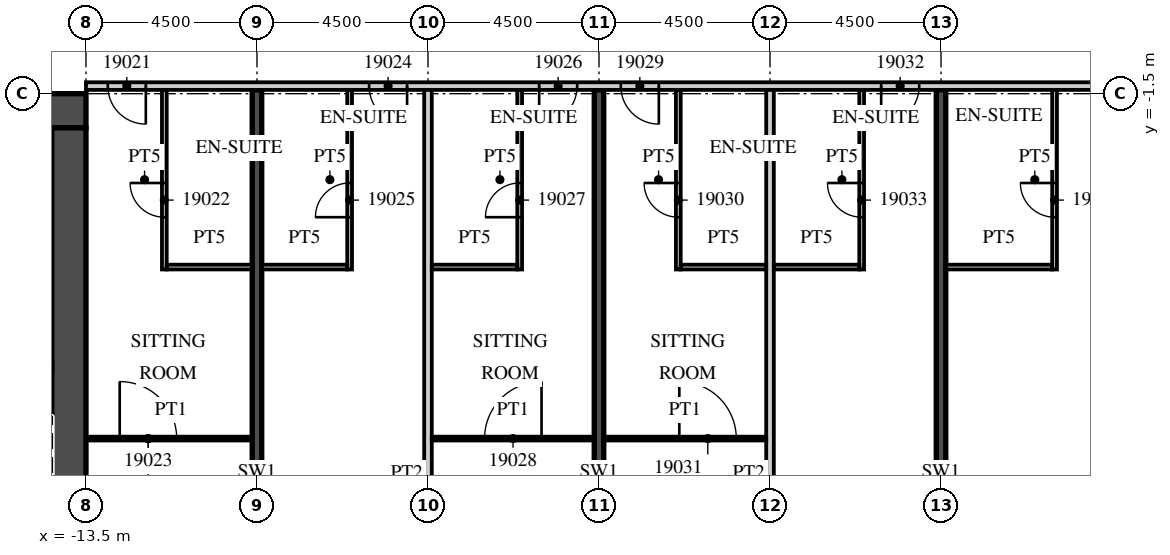
"""IFC4 building model, lengths in metres.
Left out: names, types, materials, properties, quantities, classifications, styles, units other than length and angle.
Written with IfcOpenShell. Run it as: python <this file> out.ifc"""

import sys

from ifc_helpers import new_model, si_unit, direction, frame, frame_2d, origin, place, context, subcontext, project, spatial, rectangle, extrude, element, fill, save


model = new_model("IFC4")
c1 = context("Model", 3, precision=1e-05, world=origin(), true_north=direction((0.0, 1.0)))
c2 = subcontext(c1, "Body", "Model", "MODEL_VIEW")
j1 = project(units=[si_unit("LENGTHUNIT", "METRE"), si_unit("PLANEANGLEUNIT", "RADIAN")], contexts=[c1])
p1 = place(None, origin())
s1 = spatial("IfcSite", under=j1, at=p1, CompositionType="ELEMENT")
p2 = place(p1, origin())
s2 = spatial("IfcBuilding", under=s1, at=p2, CompositionType="ELEMENT")
p3 = place(p2, frame((0.0, 0.0, 93.0)))
s3 = spatial("IfcBuildingStorey", under=s2, at=p3, CompositionType="ELEMENT", Elevation=93.0)
for number, where, z_axis, x_axis in (
    (1, (-9.0, -21.54, 0.0), (0.0, 0.0, 1.0), (0.0, 1.0, 0.0)),
    (2, (0.0, -21.54, 0.0), (0.0, 0.0, 1.0), (0.0, 1.0, 0.0)),
    (3, (9.0, -21.54, 0.0), (0.0, 0.0, 1.0), (0.0, 1.0, 0.0)),
):
    element("IfcWall", number, at=place(p3, frame(where, z_axis=z_axis, x_axis=x_axis)), inside=s3, PredefinedType="SHEAR", context=c2, shape_type="SweptSolid", body=[
        extrude(rectangle(XDim=20.14, YDim=0.25, at=frame_2d((10.07, 0.0))), origin(), (0.0, 0.0, 1.0), 3.3),
    ])
p4 = place(p3, frame((-13.5, -1.3, 0.0), z_axis=(0.0, 0.0, 1.0), x_axis=(1.0, 0.0, 0.0)))
e4 = element("IfcWall", 4, at=p4, inside=s3, PredefinedType="PARTITIONING", context=c2, shape_type="SweptSolid", body=[
    extrude(rectangle(XDim=58.05, YDim=0.2, at=frame_2d((29.025, 0.0))), origin(), (0.0, 0.0, 1.0), 3.02),
])
p5 = place(p4, frame((0.575, 0.0, 0.0)))
e5 = element("IfcOpeningElement", 5, at=p5, cuts=e4, PredefinedType="OPENING", context=c2, shape_type="SweptSolid", body=[
    extrude(rectangle(XDim=1.0, YDim=2.1, at=frame_2d((0.5, 1.05))), frame((0.0, 0.11, 0.0), z_axis=(0.0, -1.0, 0.0), x_axis=(1.0, 0.0, 0.0)), (0.0, 0.0, 1.0), 0.22),
])
p6 = place(p4, frame((7.45, 0.0, 0.0)))
e6 = element("IfcOpeningElement", 6, at=p6, cuts=e4, PredefinedType="OPENING", context=c2, shape_type="SweptSolid", body=[
    extrude(rectangle(XDim=1.0, YDim=2.1, at=frame_2d((0.5, 1.05))), frame((0.0, 0.11, 0.0), z_axis=(0.0, -1.0, 0.0), x_axis=(1.0, 0.0, 0.0)), (0.0, 0.0, 1.0), 0.22),
])
p7 = place(p4, frame((11.925, 0.0, 0.0)))
e7 = element("IfcOpeningElement", 7, at=p7, cuts=e4, PredefinedType="OPENING", context=c2, shape_type="SweptSolid", body=[
    extrude(rectangle(XDim=1.0, YDim=2.1, at=frame_2d((0.5, 1.05))), frame((0.0, 0.11, 0.0), z_axis=(0.0, -1.0, 0.0), x_axis=(1.0, 0.0, 0.0)), (0.0, 0.0, 1.0), 0.22),
])
p8 = place(p4, frame((14.075, 0.0, 0.0)))
e8 = element("IfcOpeningElement", 8, at=p8, cuts=e4, PredefinedType="OPENING", context=c2, shape_type="SweptSolid", body=[
    extrude(rectangle(XDim=1.0, YDim=2.1, at=frame_2d((0.5, 1.05))), frame((0.0, 0.11, 0.0), z_axis=(0.0, -1.0, 0.0), x_axis=(1.0, 0.0, 0.0)), (0.0, 0.0, 1.0), 0.22),
])
p9 = place(p4, frame((20.925, 0.0, 0.0)))
e9 = element("IfcOpeningElement", 9, at=p9, cuts=e4, PredefinedType="OPENING", context=c2, shape_type="SweptSolid", body=[
    extrude(rectangle(XDim=1.0, YDim=2.1, at=frame_2d((0.5, 1.05))), frame((0.0, 0.11, 0.0), z_axis=(0.0, -1.0, 0.0), x_axis=(1.0, 0.0, 0.0)), (0.0, 0.0, 1.0), 0.22),
])
p10 = place(p4, frame((27.862, 0.0, 0.0)))
e10 = element("IfcOpeningElement", 10, at=p10, cuts=e4, PredefinedType="OPENING", context=c2, shape_type="SweptSolid", body=[
    extrude(rectangle(XDim=1.2, YDim=2.1, at=frame_2d((0.6, 1.05))), frame((0.0, 0.11, 0.0), z_axis=(0.0, -1.0, 0.0), x_axis=(1.0, 0.0, 0.0)), (0.0, 0.0, 1.0), 0.22),
])
p11 = place(p4, frame((33.938, 0.0, 0.0)))
e11 = element("IfcOpeningElement", 11, at=p11, cuts=e4, PredefinedType="OPENING", context=c2, shape_type="SweptSolid", body=[
    extrude(rectangle(XDim=1.2, YDim=2.1, at=frame_2d((0.6, 1.05))), frame((0.0, 0.11, 0.0), z_axis=(0.0, -1.0, 0.0), x_axis=(1.0, 0.0, 0.0)), (0.0, 0.0, 1.0), 0.22),
])
p12 = place(p4, frame((45.862, 0.0, 0.0)))
e12 = element("IfcOpeningElement", 12, at=p12, cuts=e4, PredefinedType="OPENING", context=c2, shape_type="SweptSolid", body=[
    extrude(rectangle(XDim=1.2, YDim=2.1, at=frame_2d((0.6, 1.05))), frame((0.0, 0.11, 0.0), z_axis=(0.0, -1.0, 0.0), x_axis=(1.0, 0.0, 0.0)), (0.0, 0.0, 1.0), 0.22),
])
p13 = place(p4, frame((52.425, 0.0, 0.0)))
e13 = element("IfcOpeningElement", 13, at=p13, cuts=e4, PredefinedType="OPENING", context=c2, shape_type="SweptSolid", body=[
    extrude(rectangle(XDim=1.0, YDim=2.1, at=frame_2d((0.5, 1.05))), frame((0.0, 0.11, 0.0), z_axis=(0.0, -1.0, 0.0), x_axis=(1.0, 0.0, 0.0)), (0.0, 0.0, 1.0), 0.22),
])
p14 = place(p4, frame((56.525, 0.0, 0.0)))
e14 = element("IfcOpeningElement", 14, at=p14, cuts=e4, PredefinedType="OPENING", context=c2, shape_type="SweptSolid", body=[
    extrude(rectangle(XDim=1.0, YDim=2.1, at=frame_2d((0.5, 1.05))), frame((0.0, 0.11, 0.0), z_axis=(0.0, -1.0, 0.0), x_axis=(1.0, 0.0, 0.0)), (0.0, 0.0, 1.0), 0.22),
])
p15 = place(p3, frame((-11.438, -6.125, 0.0), z_axis=(0.0, 0.0, 1.0), x_axis=(0.0, 1.0, 0.0)))
e15 = element("IfcWall", 15, at=p15, inside=s3, PredefinedType="PARTITIONING", context=c2, shape_type="SweptSolid", body=[
    extrude(rectangle(XDim=4.725, YDim=0.125, at=frame_2d((2.363, 0.0))), origin(), (0.0, 0.0, 1.0), 3.02),
])
p16 = place(p15, frame((1.375, 0.0, 0.0)))
e16 = element("IfcOpeningElement", 16, at=p16, cuts=e15, PredefinedType="OPENING", context=c2, shape_type="SweptSolid", body=[
    extrude(rectangle(XDim=0.9, YDim=2.1, at=frame_2d((0.45, 1.05))), frame((0.0, 0.073, 0.0), z_axis=(0.0, -1.0, 0.0), x_axis=(1.0, 0.0, 0.0)), (0.0, 0.0, 1.0), 0.145),
])
p17 = place(p3, frame((-11.375, -6.062, 0.0), z_axis=(0.0, 0.0, 1.0), x_axis=(1.0, 0.0, 0.0)))
e17 = element("IfcWall", 17, at=p17, inside=s3, PredefinedType="PARTITIONING", context=c2, shape_type="SweptSolid", body=[
    extrude(rectangle(XDim=2.25, YDim=0.125, at=frame_2d((1.125, 0.0))), origin(), (0.0, 0.0, 1.0), 3.02),
])
p18 = place(p3, frame((-13.4, -10.575, 0.0), z_axis=(0.0, 0.0, 1.0), x_axis=(1.0, 0.0, 0.0)))
e18 = element("IfcWall", 18, at=p18, inside=s3, PredefinedType="PARTITIONING", context=c2, shape_type="SweptSolid", body=[
    extrude(rectangle(XDim=4.275, YDim=0.1, at=frame_2d((2.137, 0.0))), origin(), (0.0, 0.0, 1.0), 3.02),
])
p19 = place(p18, frame((0.788, 0.0, 0.0)))
e19 = element("IfcOpeningElement", 19, at=p19, cuts=e18, PredefinedType="OPENING", context=c2, shape_type="SweptSolid", body=[
    extrude(rectangle(XDim=1.5, YDim=2.1, at=frame_2d((0.75, 1.05))), frame((0.0, 0.06, 0.0), z_axis=(0.0, -1.0, 0.0), x_axis=(1.0, 0.0, 0.0)), (0.0, 0.0, 1.0), 0.12),
])
p20 = place(p3, frame((-4.5, -21.55, 0.0), z_axis=(0.0, 0.0, 1.0), x_axis=(0.0, 1.0, 0.0)))
e20 = element("IfcWall", 20, at=p20, inside=s3, PredefinedType="PARTITIONING", context=c2, shape_type="SweptSolid", body=[
    extrude(rectangle(XDim=20.15, YDim=0.2, at=frame_2d((10.075, 0.0))), origin(), (0.0, 0.0, 1.0), 3.02),
])
p21 = place(p3, frame((-6.562, -6.125, 0.0), z_axis=(0.0, 0.0, 1.0), x_axis=(0.0, 1.0, 0.0)))
e21 = element("IfcWall", 21, at=p21, inside=s3, PredefinedType="PARTITIONING", context=c2, shape_type="SweptSolid", body=[
    extrude(rectangle(XDim=4.725, YDim=0.125, at=frame_2d((2.363, 0.0))), origin(), (0.0, 0.0, 1.0), 3.02),
])
p22 = place(p21, frame((1.375, 0.0, 0.0)))
e22 = element("IfcOpeningElement", 22, at=p22, cuts=e21, PredefinedType="OPENING", context=c2, shape_type="SweptSolid", body=[
    extrude(rectangle(XDim=0.9, YDim=2.1, at=frame_2d((0.45, 1.05))), frame((0.0, 0.073, 0.0), z_axis=(0.0, -1.0, 0.0), x_axis=(1.0, 0.0, 0.0)), (0.0, 0.0, 1.0), 0.145),
])
p23 = place(p3, frame((-8.875, -6.062, 0.0), z_axis=(0.0, 0.0, 1.0), x_axis=(1.0, 0.0, 0.0)))
e23 = element("IfcWall", 23, at=p23, inside=s3, PredefinedType="PARTITIONING", context=c2, shape_type="SweptSolid", body=[
    extrude(rectangle(XDim=2.25, YDim=0.125, at=frame_2d((1.125, 0.0))), origin(), (0.0, 0.0, 1.0), 3.02),
])
p24 = place(p3, frame((-2.087, -6.125, 0.0), z_axis=(0.0, 0.0, 1.0), x_axis=(0.0, 1.0, 0.0)))
e24 = element("IfcWall", 24, at=p24, inside=s3, PredefinedType="PARTITIONING", context=c2, shape_type="SweptSolid", body=[
    extrude(rectangle(XDim=4.725, YDim=0.125, at=frame_2d((2.363, 0.0))), origin(), (0.0, 0.0, 1.0), 3.02),
])
p25 = place(p24, frame((1.375, 0.0, 0.0)))
e25 = element("IfcOpeningElement", 25, at=p25, cuts=e24, PredefinedType="OPENING", context=c2, shape_type="SweptSolid", body=[
    extrude(rectangle(XDim=0.9, YDim=2.1, at=frame_2d((0.45, 1.05))), frame((0.0, 0.073, 0.0), z_axis=(0.0, -1.0, 0.0), x_axis=(1.0, 0.0, 0.0)), (0.0, 0.0, 1.0), 0.145),
])
p26 = place(p3, frame((-4.4, -6.062, 0.0), z_axis=(0.0, 0.0, 1.0), x_axis=(1.0, 0.0, 0.0)))
e26 = element("IfcWall", 26, at=p26, inside=s3, PredefinedType="PARTITIONING", context=c2, shape_type="SweptSolid", body=[
    extrude(rectangle(XDim=2.25, YDim=0.125, at=frame_2d((1.125, 0.0))), origin(), (0.0, 0.0, 1.0), 3.02),
])
p27 = place(p3, frame((-4.4, -10.575, 0.0), z_axis=(0.0, 0.0, 1.0), x_axis=(1.0, 0.0, 0.0)))
e27 = element("IfcWall", 27, at=p27, inside=s3, PredefinedType="PARTITIONING", context=c2, shape_type="SweptSolid", body=[
    extrude(rectangle(XDim=4.275, YDim=0.1, at=frame_2d((2.137, 0.0))), origin(), (0.0, 0.0, 1.0), 3.02),
])
p28 = place(p27, frame((1.388, 0.0, 0.0)))
e28 = element("IfcOpeningElement", 28, at=p28, cuts=e27, PredefinedType="OPENING", context=c2, shape_type="SweptSolid", body=[
    extrude(rectangle(XDim=1.5, YDim=2.1, at=frame_2d((0.75, 1.05))), frame((0.0, 0.06, 0.0), z_axis=(0.0, -1.0, 0.0), x_axis=(1.0, 0.0, 0.0)), (0.0, 0.0, 1.0), 0.12),
])
p29 = place(p3, frame((4.5, -21.55, 0.0), z_axis=(0.0, 0.0, 1.0), x_axis=(0.0, 1.0, 0.0)))
e29 = element("IfcWall", 29, at=p29, inside=s3, PredefinedType="PARTITIONING", context=c2, shape_type="SweptSolid", body=[
    extrude(rectangle(XDim=20.15, YDim=0.2, at=frame_2d((10.075, 0.0))), origin(), (0.0, 0.0, 1.0), 3.02),
])
p30 = place(p3, frame((2.087, -6.125, 0.0), z_axis=(0.0, 0.0, 1.0), x_axis=(0.0, 1.0, 0.0)))
e30 = element("IfcWall", 30, at=p30, inside=s3, PredefinedType="PARTITIONING", context=c2, shape_type="SweptSolid", body=[
    extrude(rectangle(XDim=4.725, YDim=0.125, at=frame_2d((2.363, 0.0))), origin(), (0.0, 0.0, 1.0), 3.02),
])
p31 = place(p30, frame((1.375, 0.0, 0.0)))
e31 = element("IfcOpeningElement", 31, at=p31, cuts=e30, PredefinedType="OPENING", context=c2, shape_type="SweptSolid", body=[
    extrude(rectangle(XDim=0.9, YDim=2.1, at=frame_2d((0.45, 1.05))), frame((0.0, 0.073, 0.0), z_axis=(0.0, -1.0, 0.0), x_axis=(1.0, 0.0, 0.0)), (0.0, 0.0, 1.0), 0.145),
])
p32 = place(p3, frame((2.15, -6.062, 0.0), z_axis=(0.0, 0.0, 1.0), x_axis=(1.0, 0.0, 0.0)))
e32 = element("IfcWall", 32, at=p32, inside=s3, PredefinedType="PARTITIONING", context=c2, shape_type="SweptSolid", body=[
    extrude(rectangle(XDim=2.25, YDim=0.125, at=frame_2d((1.125, 0.0))), origin(), (0.0, 0.0, 1.0), 3.02),
])
p33 = place(p3, frame((0.125, -10.575, 0.0), z_axis=(0.0, 0.0, 1.0), x_axis=(1.0, 0.0, 0.0)))
e33 = element("IfcWall", 33, at=p33, inside=s3, PredefinedType="PARTITIONING", context=c2, shape_type="SweptSolid", body=[
    extrude(rectangle(XDim=4.275, YDim=0.1, at=frame_2d((2.137, 0.0))), origin(), (0.0, 0.0, 1.0), 3.02),
])
p34 = place(p33, frame((1.988, 0.0, 0.0)))
e34 = element("IfcOpeningElement", 34, at=p34, cuts=e33, PredefinedType="OPENING", context=c2, shape_type="SweptSolid", body=[
    extrude(rectangle(XDim=1.5, YDim=2.1, at=frame_2d((0.75, 1.05))), frame((0.0, 0.06, 0.0), z_axis=(0.0, -1.0, 0.0), x_axis=(1.0, 0.0, 0.0)), (0.0, 0.0, 1.0), 0.12),
])
p35 = place(p3, frame((6.912, -6.125, 0.0), z_axis=(0.0, 0.0, 1.0), x_axis=(0.0, 1.0, 0.0)))
e35 = element("IfcWall", 35, at=p35, inside=s3, PredefinedType="PARTITIONING", context=c2, shape_type="SweptSolid", body=[
    extrude(rectangle(XDim=4.725, YDim=0.125, at=frame_2d((2.363, 0.0))), origin(), (0.0, 0.0, 1.0), 3.02),
])
p36 = place(p35, frame((1.375, 0.0, 0.0)))
e36 = element("IfcOpeningElement", 36, at=p36, cuts=e35, PredefinedType="OPENING", context=c2, shape_type="SweptSolid", body=[
    extrude(rectangle(XDim=0.9, YDim=2.1, at=frame_2d((0.45, 1.05))), frame((0.0, 0.073, 0.0), z_axis=(0.0, -1.0, 0.0), x_axis=(1.0, 0.0, 0.0)), (0.0, 0.0, 1.0), 0.145),
])
p37 = place(p3, frame((4.6, -6.062, 0.0), z_axis=(0.0, 0.0, 1.0), x_axis=(1.0, 0.0, 0.0)))
e37 = element("IfcWall", 37, at=p37, inside=s3, PredefinedType="PARTITIONING", context=c2, shape_type="SweptSolid", body=[
    extrude(rectangle(XDim=2.25, YDim=0.125, at=frame_2d((1.125, 0.0))), origin(), (0.0, 0.0, 1.0), 3.02),
])
p38 = place(p3, frame((11.988, -6.125, 0.0), z_axis=(0.0, 0.0, 1.0), x_axis=(0.0, 1.0, 0.0)))
e38 = element("IfcWall", 38, at=p38, inside=s3, PredefinedType="PARTITIONING", context=c2, shape_type="SweptSolid", body=[
    extrude(rectangle(XDim=4.725, YDim=0.125, at=frame_2d((2.363, 0.0))), origin(), (0.0, 0.0, 1.0), 3.02),
])
p39 = place(p38, frame((1.375, 0.0, 0.0)))
e39 = element("IfcOpeningElement", 39, at=p39, cuts=e38, PredefinedType="OPENING", context=c2, shape_type="SweptSolid", body=[
    extrude(rectangle(XDim=0.9, YDim=2.1, at=frame_2d((0.45, 1.05))), frame((0.0, 0.073, 0.0), z_axis=(0.0, -1.0, 0.0), x_axis=(1.0, 0.0, 0.0)), (0.0, 0.0, 1.0), 0.145),
])
p40 = place(p3, frame((9.125, -6.062, 0.0), z_axis=(0.0, 0.0, 1.0), x_axis=(1.0, 0.0, 0.0)))
e40 = element("IfcWall", 40, at=p40, inside=s3, PredefinedType="PARTITIONING", context=c2, shape_type="SweptSolid", body=[
    extrude(rectangle(XDim=2.8, YDim=0.125, at=frame_2d((1.4, 0.0))), origin(), (0.0, 0.0, 1.0), 3.02),
])
p41 = place(p3, frame((-31.5, -1.95, 0.0), z_axis=(0.0, 0.0, 1.0), x_axis=(1.0, 0.0, 0.0)))
e41 = element("IfcWall", 41, at=p41, inside=s3, PredefinedType="SHEAR", context=c2, shape_type="SweptSolid", body=[
    extrude(rectangle(XDim=18.0, YDim=0.9, at=frame_2d((9.0, 0.0))), origin(), (0.0, 0.0, 1.0), 3.02),
])
p42 = place(p41, frame((14.725, 0.0, 0.0)))
e42 = element("IfcOpeningElement", 42, at=p42, cuts=e41, PredefinedType="OPENING", context=c2, shape_type="SweptSolid", body=[
    extrude(rectangle(XDim=1.8, YDim=2.1, at=frame_2d((0.9, 1.05))), frame((0.0, 0.46, 0.0), z_axis=(0.0, -1.0, 0.0), x_axis=(1.0, 0.0, 0.0)), (0.0, 0.0, 1.0), 0.92),
])
p43 = place(p3, frame((-13.95, -14.6, 0.0), z_axis=(0.0, 0.0, 1.0), x_axis=(0.0, 1.0, 0.0)))
e43 = element("IfcWall", 43, at=p43, inside=s3, PredefinedType="SHEAR", context=c2, shape_type="SweptSolid", body=[
    extrude(rectangle(XDim=12.2, YDim=0.9, at=frame_2d((6.1, 0.0))), origin(), (0.0, 0.0, 1.0), 3.02),
])
p44 = place(p5, origin())
e44 = element("IfcDoor", 44, at=p44, inside=s3, OperationType="SINGLE_SWING_RIGHT", PredefinedType="DOOR", context=c2, shape_type="SweptSolid", body=[
    extrude(rectangle(XDim=1.0, YDim=2.1, at=frame_2d((0.5, 1.05))), frame((0.0, 0.025, 0.0), z_axis=(0.0, -1.0, 0.0), x_axis=(1.0, 0.0, 0.0)), (0.0, 0.0, 1.0), 0.05),
])
fill(e5, e44)
p45 = place(p16, origin())
e45 = element("IfcDoor", 45, at=p45, inside=s3, OperationType="SINGLE_SWING_RIGHT", PredefinedType="DOOR", context=c2, shape_type="SweptSolid", body=[
    extrude(rectangle(XDim=0.9, YDim=2.1, at=frame_2d((0.45, 1.05))), frame((0.0, 0.025, 0.0), z_axis=(0.0, -1.0, 0.0), x_axis=(1.0, 0.0, 0.0)), (0.0, 0.0, 1.0), 0.05),
])
fill(e16, e45)
p46 = place(p19, origin())
e46 = element("IfcDoor", 46, at=p46, inside=s3, OperationType="SINGLE_SWING_LEFT", PredefinedType="DOOR", context=c2, shape_type="SweptSolid", body=[
    extrude(rectangle(XDim=1.5, YDim=2.1, at=frame_2d((0.75, 1.05))), frame((0.0, 0.025, 0.0), z_axis=(0.0, -1.0, 0.0), x_axis=(1.0, 0.0, 0.0)), (0.0, 0.0, 1.0), 0.05),
])
fill(e19, e46)
p47 = place(p6, origin())
e47 = element("IfcDoor", 47, at=p47, inside=s3, OperationType="SINGLE_SWING_RIGHT", PredefinedType="DOOR", context=c2, shape_type="SweptSolid", body=[
    extrude(rectangle(XDim=1.0, YDim=2.1, at=frame_2d((0.5, 1.05))), frame((0.0, 0.025, 0.0), z_axis=(0.0, -1.0, 0.0), x_axis=(1.0, 0.0, 0.0)), (0.0, 0.0, 1.0), 0.05),
])
fill(e6, e47)
p48 = place(p22, origin())
e48 = element("IfcDoor", 48, at=p48, inside=s3, OperationType="SINGLE_SWING_LEFT", PredefinedType="DOOR", context=c2, shape_type="SweptSolid", body=[
    extrude(rectangle(XDim=0.9, YDim=2.1, at=frame_2d((0.45, 1.05))), frame((0.0, 0.025, 0.0), z_axis=(0.0, -1.0, 0.0), x_axis=(1.0, 0.0, 0.0)), (0.0, 0.0, 1.0), 0.05),
])
fill(e22, e48)
p49 = place(p7, origin())
e49 = element("IfcDoor", 49, at=p49, inside=s3, OperationType="SINGLE_SWING_LEFT", PredefinedType="DOOR", context=c2, shape_type="SweptSolid", body=[
    extrude(rectangle(XDim=1.0, YDim=2.1, at=frame_2d((0.5, 1.05))), frame((0.0, 0.025, 0.0), z_axis=(0.0, -1.0, 0.0), x_axis=(1.0, 0.0, 0.0)), (0.0, 0.0, 1.0), 0.05),
])
fill(e7, e49)
p50 = place(p25, origin())
e50 = element("IfcDoor", 50, at=p50, inside=s3, OperationType="SINGLE_SWING_LEFT", PredefinedType="DOOR", context=c2, shape_type="SweptSolid", body=[
    extrude(rectangle(XDim=0.9, YDim=2.1, at=frame_2d((0.45, 1.05))), frame((0.0, 0.025, 0.0), z_axis=(0.0, -1.0, 0.0), x_axis=(1.0, 0.0, 0.0)), (0.0, 0.0, 1.0), 0.05),
])
fill(e25, e50)
p51 = place(p28, origin())
e51 = element("IfcDoor", 51, at=p51, inside=s3, OperationType="SINGLE_SWING_RIGHT", PredefinedType="DOOR", context=c2, shape_type="SweptSolid", body=[
    extrude(rectangle(XDim=1.5, YDim=2.1, at=frame_2d((0.75, 1.05))), frame((0.0, 0.025, 0.0), z_axis=(0.0, -1.0, 0.0), x_axis=(1.0, 0.0, 0.0)), (0.0, 0.0, 1.0), 0.05),
])
fill(e28, e51)
p52 = place(p8, origin())
e52 = element("IfcDoor", 52, at=p52, inside=s3, OperationType="SINGLE_SWING_RIGHT", PredefinedType="DOOR", context=c2, shape_type="SweptSolid", body=[
    extrude(rectangle(XDim=1.0, YDim=2.1, at=frame_2d((0.5, 1.05))), frame((0.0, 0.025, 0.0), z_axis=(0.0, -1.0, 0.0), x_axis=(1.0, 0.0, 0.0)), (0.0, 0.0, 1.0), 0.05),
])
fill(e8, e52)
p53 = place(p31, origin())
e53 = element("IfcDoor", 53, at=p53, inside=s3, OperationType="SINGLE_SWING_RIGHT", PredefinedType="DOOR", context=c2, shape_type="SweptSolid", body=[
    extrude(rectangle(XDim=0.9, YDim=2.1, at=frame_2d((0.45, 1.05))), frame((0.0, 0.025, 0.0), z_axis=(0.0, -1.0, 0.0), x_axis=(1.0, 0.0, 0.0)), (0.0, 0.0, 1.0), 0.05),
])
fill(e31, e53)
p54 = place(p34, origin())
e54 = element("IfcDoor", 54, at=p54, inside=s3, OperationType="SINGLE_SWING_LEFT", PredefinedType="DOOR", context=c2, shape_type="SweptSolid", body=[
    extrude(rectangle(XDim=1.5, YDim=2.1, at=frame_2d((0.75, 1.05))), frame((0.0, 0.025, 0.0), z_axis=(0.0, -1.0, 0.0), x_axis=(1.0, 0.0, 0.0)), (0.0, 0.0, 1.0), 0.05),
])
fill(e34, e54)
p55 = place(p9, origin())
e55 = element("IfcDoor", 55, at=p55, inside=s3, OperationType="SINGLE_SWING_LEFT", PredefinedType="DOOR", context=c2, shape_type="SweptSolid", body=[
    extrude(rectangle(XDim=1.0, YDim=2.1, at=frame_2d((0.5, 1.05))), frame((0.0, 0.025, 0.0), z_axis=(0.0, -1.0, 0.0), x_axis=(1.0, 0.0, 0.0)), (0.0, 0.0, 1.0), 0.05),
])
fill(e9, e55)
p56 = place(p36, origin())
e56 = element("IfcDoor", 56, at=p56, inside=s3, OperationType="SINGLE_SWING_RIGHT", PredefinedType="DOOR", context=c2, shape_type="SweptSolid", body=[
    extrude(rectangle(XDim=0.9, YDim=2.1, at=frame_2d((0.45, 1.05))), frame((0.0, 0.025, 0.0), z_axis=(0.0, -1.0, 0.0), x_axis=(1.0, 0.0, 0.0)), (0.0, 0.0, 1.0), 0.05),
])
fill(e36, e56)
p57 = place(p39, origin())
e57 = element("IfcDoor", 57, at=p57, inside=s3, OperationType="SINGLE_SWING_RIGHT", PredefinedType="DOOR", context=c2, shape_type="SweptSolid", body=[
    extrude(rectangle(XDim=0.9, YDim=2.1, at=frame_2d((0.45, 1.05))), frame((0.0, 0.025, 0.0), z_axis=(0.0, -1.0, 0.0), x_axis=(1.0, 0.0, 0.0)), (0.0, 0.0, 1.0), 0.05),
])
fill(e39, e57)
save(model, sys.argv[1])
